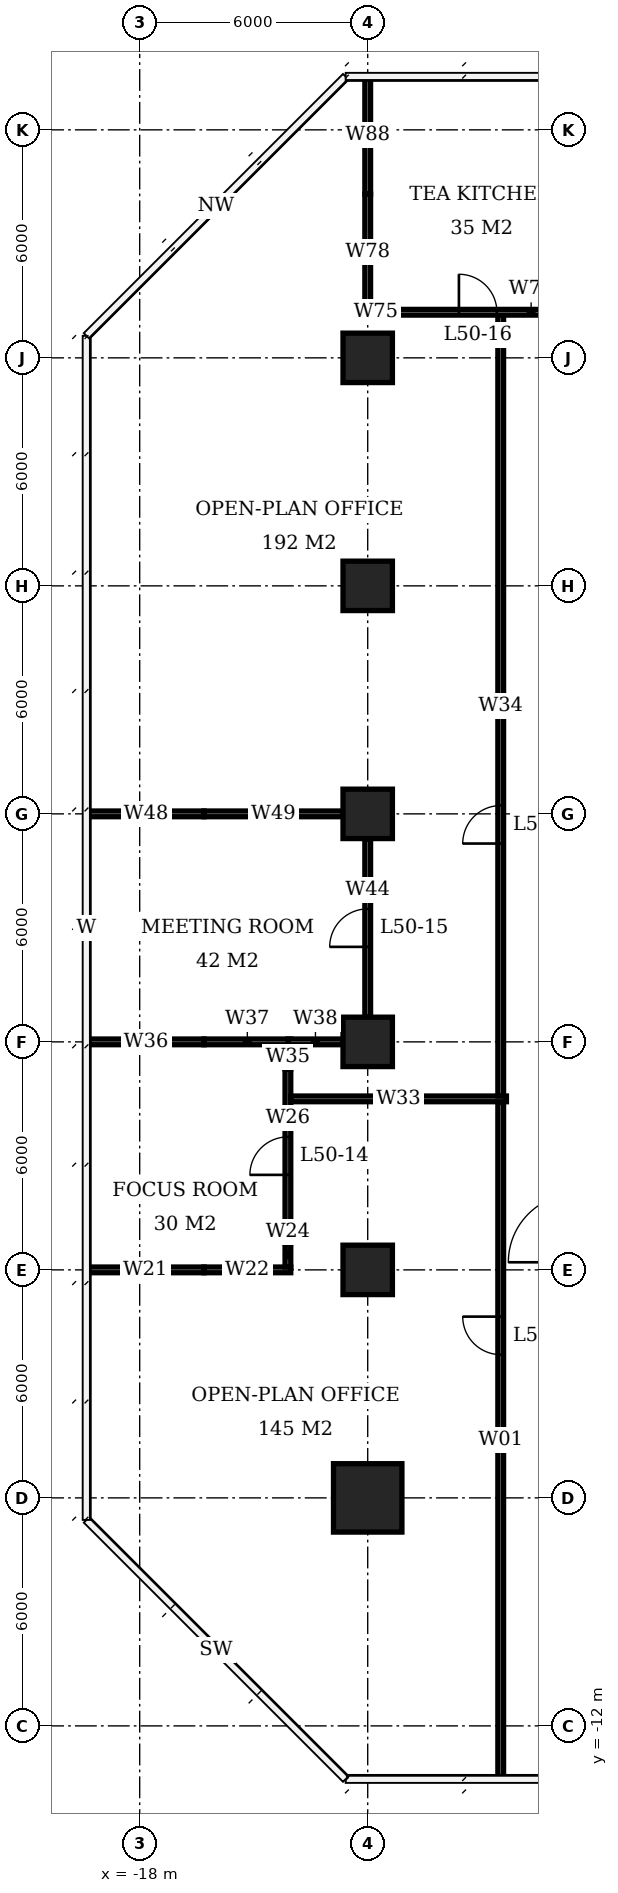
"""IFC4 building model, lengths in metres.
Left out: names, types, materials, properties, quantities, classifications, styles, units other than length and angle.
Written with IfcOpenShell. Run it as: python <this file> out.ifc"""

import sys

from ifc_helpers import new_model, si_unit, direction, frame, frame_2d, origin, origin_2d, place, context, subcontext, project, spatial, rectangle, extrude, element, fill, save


model = new_model("IFC4")
c1 = context("Model", 3, precision=1e-05, world=origin(), true_north=direction((0.0, 1.0)))
c2 = subcontext(c1, "Body", "Model", "MODEL_VIEW")
j1 = project(units=[si_unit("LENGTHUNIT", "METRE"), si_unit("PLANEANGLEUNIT", "RADIAN")], contexts=[c1])
p1 = place(None, origin())
s1 = spatial("IfcSite", under=j1, at=p1, CompositionType="ELEMENT")
p2 = place(p1, origin())
s2 = spatial("IfcBuilding", under=s1, at=p2, CompositionType="ELEMENT")
p3 = place(p2, frame((0.0, 0.0, 204.5)))
s3 = spatial("IfcBuildingStorey", under=s2, at=p3, CompositionType="ELEMENT", Elevation=204.5)
p4 = place(p3, frame((-12.0, -6.0, 0.0), z_axis=(0.0, 0.0, 1.0), x_axis=(1.0, 0.0, 0.0)))
e1 = element("IfcColumn", 1, at=p4, inside=s3, PredefinedType="COLUMN", context=c2, shape_type="SweptSolid", body=[
    extrude(rectangle(XDim=1.8, YDim=1.8, at=origin_2d()), origin(), (0.0, 0.0, 1.0), 3.9),
])
for number, where, z_axis, x_axis in (
    (2, (-12.0, 0.0, 0.0), (0.0, 0.0, 1.0), (1.0, 0.0, 0.0)),
    (3, (-12.0, 6.0, 0.0), (0.0, 0.0, 1.0), (1.0, 0.0, 0.0)),
    (4, (-12.0, 12.0, 0.0), (0.0, 0.0, 1.0), (1.0, 0.0, 0.0)),
    (5, (-12.0, 18.0, 0.0), (0.0, 0.0, 1.0), (1.0, 0.0, 0.0)),
    (6, (-12.0, 24.0, 0.0), (0.0, 0.0, 1.0), (1.0, 0.0, 0.0)),
):
    element("IfcColumn", number, at=place(p3, frame(where, z_axis=z_axis, x_axis=x_axis)), inside=s3, PredefinedType="COLUMN", context=c2, shape_type="SweptSolid", body=[
        extrude(rectangle(XDim=1.3, YDim=1.3, at=origin_2d()), origin(), (0.0, 0.0, 1.0), 3.9),
    ])
p5 = place(p3, frame((-19.4, 0.0, 0.0), z_axis=(0.0, 0.0, 1.0), x_axis=(1.0, 0.0, 0.0)))
e7 = element("IfcWall", 7, at=p5, inside=s3, PredefinedType="PARTITIONING", context=c2, shape_type="SweptSolid", body=[
    extrude(rectangle(XDim=3.09, YDim=0.15, at=frame_2d((1.545, 0.0))), origin(), (0.0, 0.0, 1.0), 3.65),
])
p6 = place(p3, frame((-16.31, 0.0, 0.0), z_axis=(0.0, 0.0, 1.0), x_axis=(1.0, 0.0, 0.0)))
e8 = element("IfcWall", 8, at=p6, inside=s3, PredefinedType="PARTITIONING", context=c2, shape_type="SweptSolid", body=[
    extrude(rectangle(XDim=2.285, YDim=0.15, at=frame_2d((1.143, 0.0))), origin(), (0.0, 0.0, 1.0), 2.65),
])
p7 = place(p3, frame((-19.35, 6.0, 0.0), z_axis=(0.0, 0.0, 1.0), x_axis=(1.0, 0.0, 0.0)))
e9 = element("IfcWall", 9, at=p7, inside=s3, PredefinedType="PARTITIONING", context=c2, shape_type="SweptSolid", body=[
    extrude(rectangle(XDim=3.04, YDim=0.15, at=frame_2d((1.52, 0.0))), origin(), (0.0, 0.0, 1.0), 3.65),
])
p8 = place(p3, frame((-16.31, 6.0, 0.0), z_axis=(0.0, 0.0, 1.0), x_axis=(1.0, 0.0, 0.0)))
e10 = element("IfcWall", 10, at=p8, inside=s3, PredefinedType="PARTITIONING", context=c2, shape_type="SweptSolid", body=[
    extrude(rectangle(XDim=2.285, YDim=0.15, at=frame_2d((1.143, 0.0))), origin(), (0.0, 0.0, 1.0), 2.65),
])
p9 = place(p3, frame((-14.1, 6.0, 0.0), z_axis=(0.0, 0.0, 1.0), x_axis=(1.0, 0.0, 0.0)))
e11 = element("IfcWall", 11, at=p9, inside=s3, PredefinedType="PARTITIONING", context=c2, shape_type="SweptSolid", body=[
    extrude(rectangle(XDim=1.45, YDim=0.15, at=frame_2d((0.725, 0.0))), origin(), (0.0, 0.0, 1.0), 2.65),
])
p10 = place(p3, frame((-19.35, 12.0, 0.0), z_axis=(0.0, 0.0, 1.0), x_axis=(1.0, 0.0, 0.0)))
e12 = element("IfcWall", 12, at=p10, inside=s3, PredefinedType="PARTITIONING", context=c2, shape_type="SweptSolid", body=[
    extrude(rectangle(XDim=3.04, YDim=0.15, at=frame_2d((1.52, 0.0))), origin(), (0.0, 0.0, 1.0), 3.65),
])
p11 = place(p3, frame((-16.31, 12.0, 0.0), z_axis=(0.0, 0.0, 1.0), x_axis=(1.0, 0.0, 0.0)))
e13 = element("IfcWall", 13, at=p11, inside=s3, PredefinedType="PARTITIONING", context=c2, shape_type="SweptSolid", body=[
    extrude(rectangle(XDim=3.66, YDim=0.15, at=frame_2d((1.83, 0.0))), origin(), (0.0, 0.0, 1.0), 2.65),
])
p12 = place(p3, frame((-12.075, 25.2, 0.0), z_axis=(0.0, 0.0, 1.0), x_axis=(1.0, 0.0, 0.0)))
e14 = element("IfcWall", 14, at=p12, inside=s3, PredefinedType="PARTITIONING", context=c2, shape_type="SweptSolid", body=[
    extrude(rectangle(XDim=0.585, YDim=0.15, at=frame_2d((0.292, 0.0))), origin(), (0.0, 0.0, 1.0), 2.65),
])
p13 = place(p3, frame((-11.49, 25.2, 0.0), z_axis=(0.0, 0.0, 1.0), x_axis=(1.0, 0.0, 0.0)))
e15 = element("IfcWall", 15, at=p13, inside=s3, PredefinedType="PARTITIONING", context=c2, shape_type="SweptSolid", body=[
    extrude(rectangle(XDim=4.78, YDim=0.15, at=frame_2d((2.39, 0.0))), origin(), (0.0, 0.0, 1.0), 3.65),
])
p14 = place(p13, frame((1.89, 0.0, 0.0)))
e16 = element("IfcOpeningElement", 16, at=p14, cuts=e15, PredefinedType="OPENING", context=c2, shape_type="SweptSolid", body=[
    extrude(rectangle(XDim=1.0, YDim=2.1, at=frame_2d((0.5, 1.05))), frame((0.0, 0.085, 0.0), z_axis=(0.0, -1.0, 0.0), x_axis=(1.0, 0.0, 0.0)), (0.0, 0.0, 1.0), 0.17),
])
p15 = place(p3, frame((-14.1, 0.075, 0.0), z_axis=(0.0, 0.0, 1.0), x_axis=(0.0, 1.0, 0.0)))
e17 = element("IfcWall", 17, at=p15, inside=s3, PredefinedType="PARTITIONING", context=c2, shape_type="SweptSolid", body=[
    extrude(rectangle(XDim=0.635, YDim=0.15, at=frame_2d((0.317, 0.0))), origin(), (0.0, 0.0, 1.0), 2.65),
])
p16 = place(p3, frame((-14.1, 0.71, 0.0), z_axis=(0.0, 0.0, 1.0), x_axis=(0.0, 1.0, 0.0)))
e18 = element("IfcWall", 18, at=p16, inside=s3, PredefinedType="PARTITIONING", context=c2, shape_type="SweptSolid", body=[
    extrude(rectangle(XDim=4.58, YDim=0.15, at=frame_2d((2.29, 0.0))), origin(), (0.0, 0.0, 1.0), 3.65),
])
p17 = place(p16, frame((1.79, 0.0, 0.0)))
e19 = element("IfcOpeningElement", 19, at=p17, cuts=e18, PredefinedType="OPENING", context=c2, shape_type="SweptSolid", body=[
    extrude(rectangle(XDim=1.0, YDim=2.1, at=frame_2d((0.5, 1.05))), frame((0.0, 0.085, 0.0), z_axis=(0.0, -1.0, 0.0), x_axis=(1.0, 0.0, 0.0)), (0.0, 0.0, 1.0), 0.17),
])
p18 = place(p3, frame((-14.1, 5.29, 0.0), z_axis=(0.0, 0.0, 1.0), x_axis=(0.0, 1.0, 0.0)))
e20 = element("IfcWall", 20, at=p18, inside=s3, PredefinedType="PARTITIONING", context=c2, shape_type="SweptSolid", body=[
    extrude(rectangle(XDim=0.635, YDim=0.15, at=frame_2d((0.317, 0.0))), origin(), (0.0, 0.0, 1.0), 2.65),
])
p19 = place(p3, frame((-12.0, 6.66, 0.0), z_axis=(0.0, 0.0, 1.0), x_axis=(0.0, 1.0, 0.0)))
e21 = element("IfcWall", 21, at=p19, inside=s3, PredefinedType="PARTITIONING", context=c2, shape_type="SweptSolid", body=[
    extrude(rectangle(XDim=4.68, YDim=0.15, at=frame_2d((2.34, 0.0))), origin(), (0.0, 0.0, 1.0), 3.65),
])
p20 = place(p19, frame((1.84, 0.0, 0.0)))
e22 = element("IfcOpeningElement", 22, at=p20, cuts=e21, PredefinedType="OPENING", context=c2, shape_type="SweptSolid", body=[
    extrude(rectangle(XDim=1.0, YDim=2.1, at=frame_2d((0.5, 1.05))), frame((0.0, 0.085, 0.0), z_axis=(0.0, -1.0, 0.0), x_axis=(1.0, 0.0, 0.0)), (0.0, 0.0, 1.0), 0.17),
])
p21 = place(p3, frame((-12.0, 25.275, 0.0), z_axis=(0.0, 0.0, 1.0), x_axis=(0.0, 1.0, 0.0)))
e23 = element("IfcWall", 23, at=p21, inside=s3, PredefinedType="PARTITIONING", context=c2, shape_type="SweptSolid", body=[
    extrude(rectangle(XDim=3.035, YDim=0.15, at=frame_2d((1.518, 0.0))), origin(), (0.0, 0.0, 1.0), 2.65),
])
p22 = place(p3, frame((-12.0, 28.31, 0.0), z_axis=(0.0, 0.0, 1.0), x_axis=(0.0, 1.0, 0.0)))
e24 = element("IfcWall", 24, at=p22, inside=s3, PredefinedType="PARTITIONING", context=c2, shape_type="SweptSolid", body=[
    extrude(rectangle(XDim=3.09, YDim=0.15, at=frame_2d((1.545, 0.0))), origin(), (0.0, 0.0, 1.0), 3.65),
])
p23 = place(p3, frame((-14.025, 4.5, 0.0), z_axis=(0.0, 0.0, 1.0), x_axis=(1.0, 0.0, 0.0)))
e25 = element("IfcWall", 25, at=p23, inside=s3, PredefinedType="PARTITIONING", context=c2, shape_type="SweptSolid", body=[
    extrude(rectangle(XDim=5.675, YDim=0.15, at=frame_2d((2.837, 0.0))), origin(), (0.0, 0.0, 1.0), 3.65),
])
p24 = place(p3, frame((-8.5, -13.4, 0.0), z_axis=(0.0, 0.0, 1.0), x_axis=(0.0, 1.0, 0.0)))
e26 = element("IfcWall", 26, at=p24, inside=s3, PredefinedType="PARTITIONING", context=c2, shape_type="SweptSolid", body=[
    extrude(rectangle(XDim=17.825, YDim=0.15, at=frame_2d((8.913, 0.0))), origin(), (0.0, 0.0, 1.0), 3.65),
])
p25 = place(p24, frame((11.17, 0.0, 0.0)))
e27 = element("IfcOpeningElement", 27, at=p25, cuts=e26, PredefinedType="OPENING", context=c2, shape_type="SweptSolid", body=[
    extrude(rectangle(XDim=1.0, YDim=2.1, at=frame_2d((0.5, 1.05))), frame((0.0, 0.085, 0.0), z_axis=(0.0, -1.0, 0.0), x_axis=(1.0, 0.0, 0.0)), (0.0, 0.0, 1.0), 0.17),
])
p26 = place(p3, frame((-8.5, 4.575, 0.0), z_axis=(0.0, 0.0, 1.0), x_axis=(0.0, 1.0, 0.0)))
e28 = element("IfcWall", 28, at=p26, inside=s3, PredefinedType="PARTITIONING", context=c2, shape_type="SweptSolid", body=[
    extrude(rectangle(XDim=20.55, YDim=0.15, at=frame_2d((10.275, 0.0))), origin(), (0.0, 0.0, 1.0), 3.65),
])
p27 = place(p26, frame((6.644, 0.0, 0.0)))
e29 = element("IfcOpeningElement", 29, at=p27, cuts=e28, PredefinedType="OPENING", context=c2, shape_type="SweptSolid", body=[
    extrude(rectangle(XDim=1.0, YDim=2.1, at=frame_2d((0.5, 1.05))), frame((0.0, 0.085, 0.0), z_axis=(0.0, -1.0, 0.0), x_axis=(1.0, 0.0, 0.0)), (0.0, 0.0, 1.0), 0.17),
])
p28 = place(p17, origin())
e30 = element("IfcDoor", 30, at=p28, inside=s3, OperationType="SINGLE_SWING_LEFT", PredefinedType="DOOR", context=c2, shape_type="SweptSolid", body=[
    extrude(rectangle(XDim=1.0, YDim=2.1, at=frame_2d((0.5, 1.05))), frame((0.0, 0.025, 0.0), z_axis=(0.0, -1.0, 0.0), x_axis=(1.0, 0.0, 0.0)), (0.0, 0.0, 1.0), 0.05),
])
fill(e19, e30)
p29 = place(p20, origin())
e31 = element("IfcDoor", 31, at=p29, inside=s3, OperationType="SINGLE_SWING_LEFT", PredefinedType="DOOR", context=c2, shape_type="SweptSolid", body=[
    extrude(rectangle(XDim=1.0, YDim=2.1, at=frame_2d((0.5, 1.05))), frame((0.0, 0.025, 0.0), z_axis=(0.0, -1.0, 0.0), x_axis=(1.0, 0.0, 0.0)), (0.0, 0.0, 1.0), 0.05),
])
fill(e22, e31)
p30 = place(p14, origin())
e32 = element("IfcDoor", 32, at=p30, inside=s3, OperationType="SINGLE_SWING_LEFT", PredefinedType="DOOR", context=c2, shape_type="SweptSolid", body=[
    extrude(rectangle(XDim=1.0, YDim=2.1, at=frame_2d((0.5, 1.05))), frame((0.0, 0.025, 0.0), z_axis=(0.0, -1.0, 0.0), x_axis=(1.0, 0.0, 0.0)), (0.0, 0.0, 1.0), 0.05),
])
fill(e16, e32)
p31 = place(p25, origin())
e33 = element("IfcDoor", 33, at=p31, inside=s3, OperationType="SINGLE_SWING_RIGHT", PredefinedType="DOOR", context=c2, shape_type="SweptSolid", body=[
    extrude(rectangle(XDim=1.0, YDim=2.1, at=frame_2d((0.5, 1.05))), frame((0.0, 0.025, 0.0), z_axis=(0.0, -1.0, 0.0), x_axis=(1.0, 0.0, 0.0)), (0.0, 0.0, 1.0), 0.05),
])
fill(e27, e33)
p32 = place(p27, origin())
e34 = element("IfcDoor", 34, at=p32, inside=s3, OperationType="SINGLE_SWING_LEFT", PredefinedType="DOOR", context=c2, shape_type="SweptSolid", body=[
    extrude(rectangle(XDim=1.0, YDim=2.1, at=frame_2d((0.5, 1.05))), frame((0.0, 0.025, 0.0), z_axis=(0.0, -1.0, 0.0), x_axis=(1.0, 0.0, 0.0)), (0.0, 0.0, 1.0), 0.05),
])
fill(e29, e34)
save(model, sys.argv[1])
